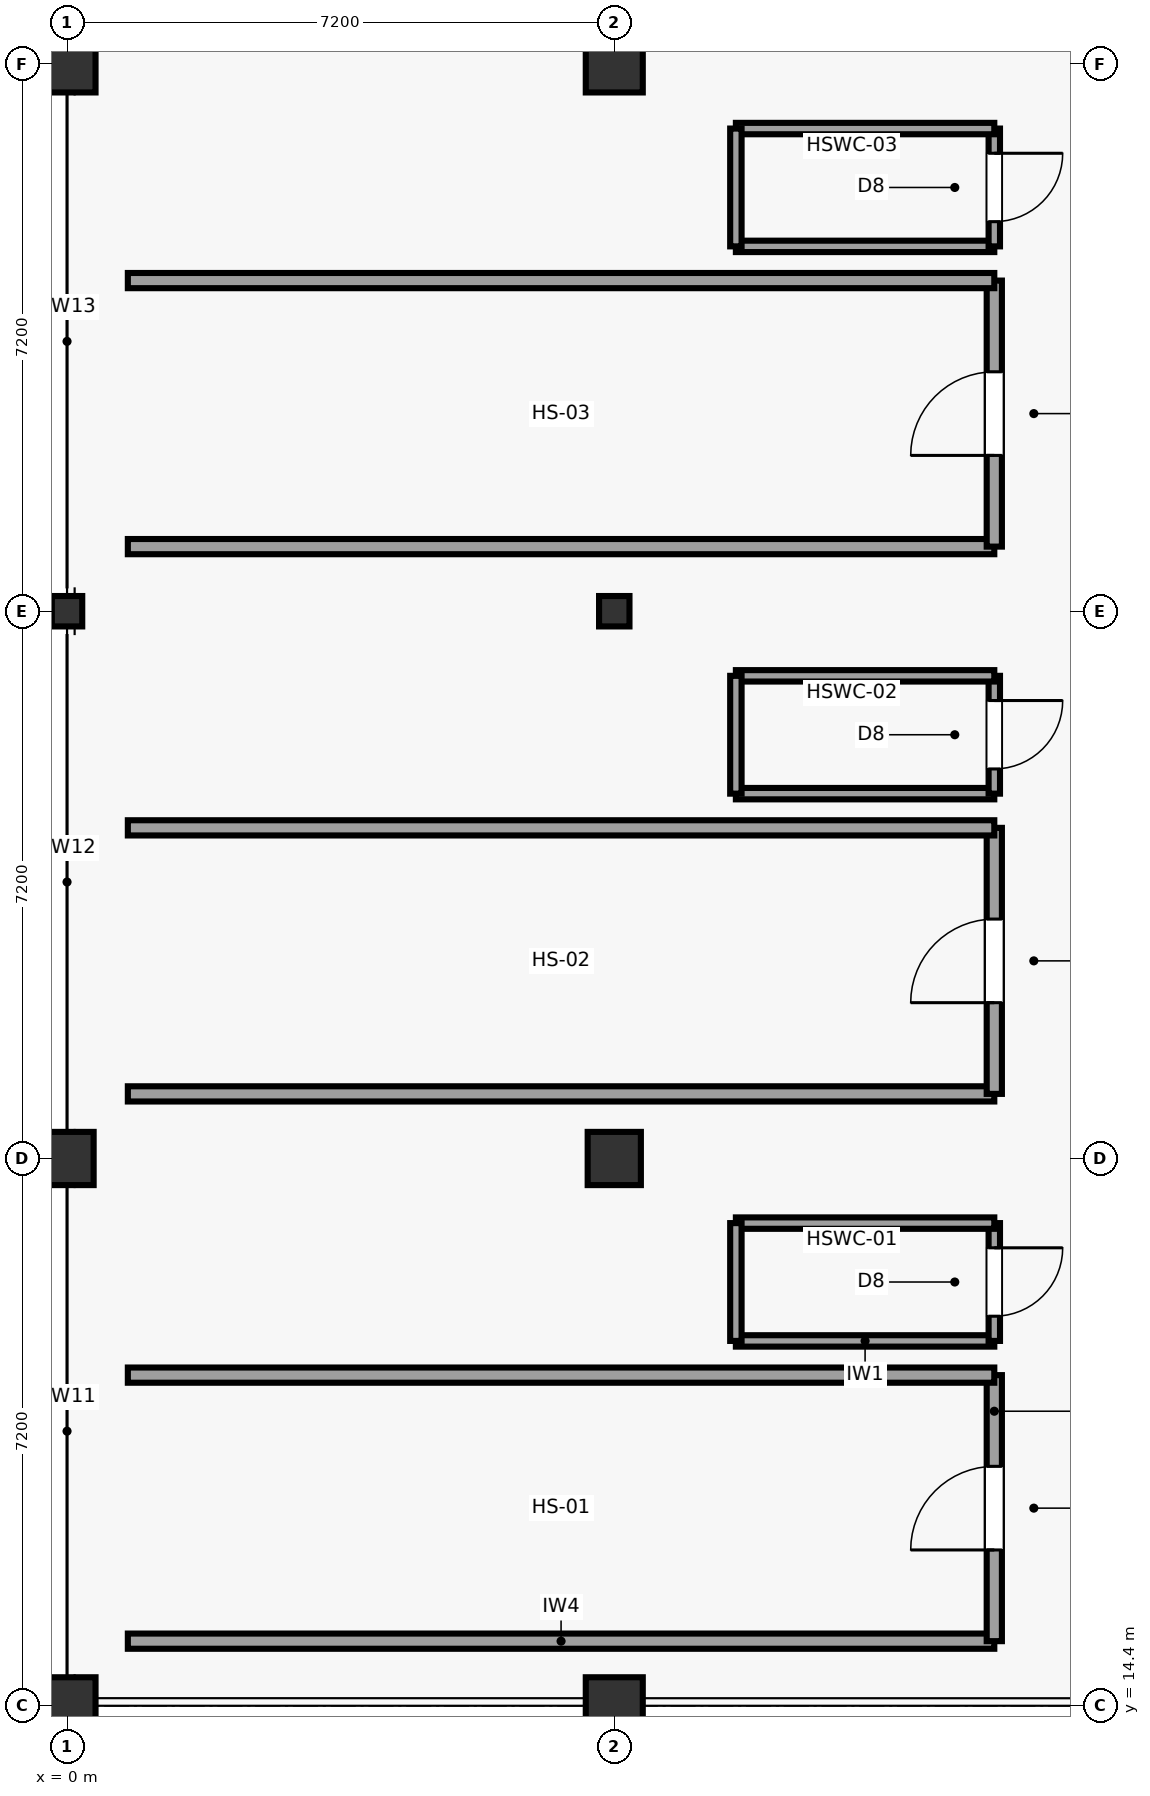
"""IFC4 building model, lengths in metres.
Left out: names, types, materials, properties, quantities, classifications, styles, units other than length and angle.
Written with IfcOpenShell. Run it as: python <this file> out.ifc"""

import sys

from ifc_helpers import new_model, si_unit, direction, frame, frame_2d, origin, origin_2d, place, context, subcontext, project, spatial, rectangle, hollow_rectangle, extrude, element, fill, save


model = new_model("IFC4")
c1 = context("Model", 3, precision=1e-05, world=origin(), true_north=direction((0.0, 1.0)))
c2 = subcontext(c1, "Body", "Model", "MODEL_VIEW")
j1 = project(units=[si_unit("LENGTHUNIT", "METRE"), si_unit("PLANEANGLEUNIT", "RADIAN")], contexts=[c1])
p1 = place(None, origin())
s1 = spatial("IfcSite", under=j1, at=p1, CompositionType="ELEMENT")
p2 = place(p1, origin())
s2 = spatial("IfcBuilding", under=s1, at=p2, CompositionType="ELEMENT")
p3 = place(p2, frame((0.0, 0.0, 9.6)))
s3 = spatial("IfcBuildingStorey", under=s2, at=p3, CompositionType="ELEMENT", Elevation=9.6)
p4 = place(p3, frame((0.0, 14.4, 0.0), z_axis=(0.0, 0.0, 1.0), x_axis=(1.0, 0.0, 0.0)))
e1 = element("IfcColumn", 1, at=p4, inside=s3, PredefinedType="COLUMN", context=c2, shape_type="SweptSolid", body=[
    extrude(rectangle(XDim=0.75, YDim=0.75, at=origin_2d()), origin(), (0.0, 0.0, 1.0), 4.2),
])
p5 = place(p3, frame((0.0, 21.6, 0.0), z_axis=(0.0, 0.0, 1.0), x_axis=(1.0, 0.0, 0.0)))
e2 = element("IfcColumn", 2, at=p5, inside=s3, PredefinedType="COLUMN", context=c2, shape_type="SweptSolid", body=[
    extrude(rectangle(XDim=0.7, YDim=0.7, at=origin_2d()), origin(), (0.0, 0.0, 1.0), 4.2),
])
p6 = place(p3, frame((0.0, 28.8, 0.0), z_axis=(0.0, 0.0, 1.0), x_axis=(1.0, 0.0, 0.0)))
e3 = element("IfcColumn", 3, at=p6, inside=s3, PredefinedType="COLUMN", context=c2, shape_type="SweptSolid", body=[
    extrude(hollow_rectangle(XDim=0.4, YDim=0.4, WallThickness=0.02, at=origin_2d()), origin(), (0.0, 0.0, 1.0), 4.2),
])
for number, where, z_axis, x_axis in (
    (4, (0.0, 36.0, 0.0), (0.0, 0.0, 1.0), (1.0, 0.0, 0.0)),
    (5, (7.2, 14.4, 0.0), (0.0, 0.0, 1.0), (1.0, 0.0, 0.0)),
):
    element("IfcColumn", number, at=place(p3, frame(where, z_axis=z_axis, x_axis=x_axis)), inside=s3, PredefinedType="COLUMN", context=c2, shape_type="SweptSolid", body=[
        extrude(rectangle(XDim=0.75, YDim=0.75, at=origin_2d()), origin(), (0.0, 0.0, 1.0), 4.2),
    ])
p7 = place(p3, frame((7.2, 21.6, 0.0), z_axis=(0.0, 0.0, 1.0), x_axis=(1.0, 0.0, 0.0)))
e6 = element("IfcColumn", 6, at=p7, inside=s3, PredefinedType="COLUMN", context=c2, shape_type="SweptSolid", body=[
    extrude(rectangle(XDim=0.7, YDim=0.7, at=origin_2d()), origin(), (0.0, 0.0, 1.0), 4.2),
])
p8 = place(p3, frame((7.2, 28.8, 0.0), z_axis=(0.0, 0.0, 1.0), x_axis=(1.0, 0.0, 0.0)))
e7 = element("IfcColumn", 7, at=p8, inside=s3, PredefinedType="COLUMN", context=c2, shape_type="SweptSolid", body=[
    extrude(hollow_rectangle(XDim=0.4, YDim=0.4, WallThickness=0.02, at=origin_2d()), origin(), (0.0, 0.0, 1.0), 4.2),
])
p9 = place(p3, frame((7.2, 36.0, 0.0), z_axis=(0.0, 0.0, 1.0), x_axis=(1.0, 0.0, 0.0)))
e8 = element("IfcColumn", 8, at=p9, inside=s3, PredefinedType="COLUMN", context=c2, shape_type="SweptSolid", body=[
    extrude(rectangle(XDim=0.75, YDim=0.75, at=origin_2d()), origin(), (0.0, 0.0, 1.0), 4.2),
])
p10 = place(p3, frame((0.8, 15.25, 0.0), z_axis=(0.0, 0.0, 1.0), x_axis=(1.0, 0.0, 0.0)))
e9 = element("IfcWall", 9, at=p10, inside=s3, PredefinedType="PARTITIONING", context=c2, shape_type="SweptSolid", body=[
    extrude(rectangle(XDim=11.4, YDim=0.2, at=frame_2d((5.7, 0.0))), origin(), (0.0, 0.0, 1.0), 2.94),
])
p11 = place(p3, frame((12.2, 15.25, 0.0), z_axis=(0.0, 0.0, 1.0), x_axis=(0.0, 1.0, 0.0)))
e10 = element("IfcWall", 10, at=p11, inside=s3, PredefinedType="PARTITIONING", context=c2, shape_type="SweptSolid", body=[
    extrude(rectangle(XDim=3.5, YDim=0.2, at=frame_2d((1.75, 0.0))), origin(), (0.0, 0.0, 1.0), 2.94),
])
p12 = place(p11, frame((1.2, 0.0, 0.0)))
e11 = element("IfcOpeningElement", 11, at=p12, cuts=e10, PredefinedType="OPENING", context=c2, shape_type="SweptSolid", body=[
    extrude(rectangle(XDim=1.1, YDim=2.25, at=frame_2d((0.55, 1.125))), frame((0.0, 0.11, 0.0), z_axis=(0.0, -1.0, 0.0), x_axis=(1.0, 0.0, 0.0)), (0.0, 0.0, 1.0), 0.22),
])
p13 = place(p3, frame((12.2, 18.75, 0.0), z_axis=(0.0, 0.0, 1.0), x_axis=(-1.0, 0.0, 0.0)))
e12 = element("IfcWall", 12, at=p13, inside=s3, PredefinedType="PARTITIONING", context=c2, shape_type="SweptSolid", body=[
    extrude(rectangle(XDim=11.4, YDim=0.2, at=frame_2d((5.7, 0.0))), origin(), (0.0, 0.0, 1.0), 2.94),
])
p14 = place(p3, frame((8.8, 19.2, 0.0), z_axis=(0.0, 0.0, 1.0), x_axis=(1.0, 0.0, 0.0)))
e13 = element("IfcWall", 13, at=p14, inside=s3, PredefinedType="PARTITIONING", context=c2, shape_type="SweptSolid", body=[
    extrude(rectangle(XDim=3.4, YDim=0.15, at=frame_2d((1.7, 0.0))), origin(), (0.0, 0.0, 1.0), 2.94),
])
p15 = place(p3, frame((12.2, 19.2, 0.0), z_axis=(0.0, 0.0, 1.0), x_axis=(0.0, 1.0, 0.0)))
e14 = element("IfcWall", 14, at=p15, inside=s3, PredefinedType="PARTITIONING", context=c2, shape_type="SweptSolid", body=[
    extrude(rectangle(XDim=1.55, YDim=0.15, at=frame_2d((0.775, 0.0))), origin(), (0.0, 0.0, 1.0), 2.94),
])
p16 = place(p15, frame((0.325, 0.0, 0.0)))
e15 = element("IfcOpeningElement", 15, at=p16, cuts=e14, PredefinedType="OPENING", context=c2, shape_type="SweptSolid", body=[
    extrude(rectangle(XDim=0.9, YDim=2.15, at=frame_2d((0.45, 1.075))), frame((0.0, 0.085, 0.0), z_axis=(0.0, -1.0, 0.0), x_axis=(1.0, 0.0, 0.0)), (0.0, 0.0, 1.0), 0.17),
])
p17 = place(p3, frame((12.2, 20.75, 0.0), z_axis=(0.0, 0.0, 1.0), x_axis=(-1.0, 0.0, 0.0)))
e16 = element("IfcWall", 16, at=p17, inside=s3, PredefinedType="PARTITIONING", context=c2, shape_type="SweptSolid", body=[
    extrude(rectangle(XDim=3.4, YDim=0.15, at=frame_2d((1.7, 0.0))), origin(), (0.0, 0.0, 1.0), 2.94),
])
p18 = place(p3, frame((8.8, 20.75, 0.0), z_axis=(0.0, 0.0, 1.0), x_axis=(0.0, -1.0, 0.0)))
e17 = element("IfcWall", 17, at=p18, inside=s3, PredefinedType="PARTITIONING", context=c2, shape_type="SweptSolid", body=[
    extrude(rectangle(XDim=1.55, YDim=0.15, at=frame_2d((0.775, 0.0))), origin(), (0.0, 0.0, 1.0), 2.94),
])
p19 = place(p3, frame((0.8, 22.45, 0.0), z_axis=(0.0, 0.0, 1.0), x_axis=(1.0, 0.0, 0.0)))
e18 = element("IfcWall", 18, at=p19, inside=s3, PredefinedType="PARTITIONING", context=c2, shape_type="SweptSolid", body=[
    extrude(rectangle(XDim=11.4, YDim=0.2, at=frame_2d((5.7, 0.0))), origin(), (0.0, 0.0, 1.0), 2.94),
])
p20 = place(p3, frame((12.2, 22.45, 0.0), z_axis=(0.0, 0.0, 1.0), x_axis=(0.0, 1.0, 0.0)))
e19 = element("IfcWall", 19, at=p20, inside=s3, PredefinedType="PARTITIONING", context=c2, shape_type="SweptSolid", body=[
    extrude(rectangle(XDim=3.5, YDim=0.2, at=frame_2d((1.75, 0.0))), origin(), (0.0, 0.0, 1.0), 2.94),
])
p21 = place(p20, frame((1.2, 0.0, 0.0)))
e20 = element("IfcOpeningElement", 20, at=p21, cuts=e19, PredefinedType="OPENING", context=c2, shape_type="SweptSolid", body=[
    extrude(rectangle(XDim=1.1, YDim=2.25, at=frame_2d((0.55, 1.125))), frame((0.0, 0.11, 0.0), z_axis=(0.0, -1.0, 0.0), x_axis=(1.0, 0.0, 0.0)), (0.0, 0.0, 1.0), 0.22),
])
p22 = place(p3, frame((12.2, 25.95, 0.0), z_axis=(0.0, 0.0, 1.0), x_axis=(-1.0, 0.0, 0.0)))
e21 = element("IfcWall", 21, at=p22, inside=s3, PredefinedType="PARTITIONING", context=c2, shape_type="SweptSolid", body=[
    extrude(rectangle(XDim=11.4, YDim=0.2, at=frame_2d((5.7, 0.0))), origin(), (0.0, 0.0, 1.0), 2.94),
])
p23 = place(p3, frame((8.8, 26.4, 0.0), z_axis=(0.0, 0.0, 1.0), x_axis=(1.0, 0.0, 0.0)))
e22 = element("IfcWall", 22, at=p23, inside=s3, PredefinedType="PARTITIONING", context=c2, shape_type="SweptSolid", body=[
    extrude(rectangle(XDim=3.4, YDim=0.15, at=frame_2d((1.7, 0.0))), origin(), (0.0, 0.0, 1.0), 2.94),
])
p24 = place(p3, frame((12.2, 26.4, 0.0), z_axis=(0.0, 0.0, 1.0), x_axis=(0.0, 1.0, 0.0)))
e23 = element("IfcWall", 23, at=p24, inside=s3, PredefinedType="PARTITIONING", context=c2, shape_type="SweptSolid", body=[
    extrude(rectangle(XDim=1.55, YDim=0.15, at=frame_2d((0.775, 0.0))), origin(), (0.0, 0.0, 1.0), 2.94),
])
p25 = place(p24, frame((0.325, 0.0, 0.0)))
e24 = element("IfcOpeningElement", 24, at=p25, cuts=e23, PredefinedType="OPENING", context=c2, shape_type="SweptSolid", body=[
    extrude(rectangle(XDim=0.9, YDim=2.15, at=frame_2d((0.45, 1.075))), frame((0.0, 0.085, 0.0), z_axis=(0.0, -1.0, 0.0), x_axis=(1.0, 0.0, 0.0)), (0.0, 0.0, 1.0), 0.17),
])
p26 = place(p3, frame((12.2, 27.95, 0.0), z_axis=(0.0, 0.0, 1.0), x_axis=(-1.0, 0.0, 0.0)))
e25 = element("IfcWall", 25, at=p26, inside=s3, PredefinedType="PARTITIONING", context=c2, shape_type="SweptSolid", body=[
    extrude(rectangle(XDim=3.4, YDim=0.15, at=frame_2d((1.7, 0.0))), origin(), (0.0, 0.0, 1.0), 2.94),
])
p27 = place(p3, frame((8.8, 27.95, 0.0), z_axis=(0.0, 0.0, 1.0), x_axis=(0.0, -1.0, 0.0)))
e26 = element("IfcWall", 26, at=p27, inside=s3, PredefinedType="PARTITIONING", context=c2, shape_type="SweptSolid", body=[
    extrude(rectangle(XDim=1.55, YDim=0.15, at=frame_2d((0.775, 0.0))), origin(), (0.0, 0.0, 1.0), 2.94),
])
p28 = place(p3, frame((0.8, 29.65, 0.0), z_axis=(0.0, 0.0, 1.0), x_axis=(1.0, 0.0, 0.0)))
e27 = element("IfcWall", 27, at=p28, inside=s3, PredefinedType="PARTITIONING", context=c2, shape_type="SweptSolid", body=[
    extrude(rectangle(XDim=11.4, YDim=0.2, at=frame_2d((5.7, 0.0))), origin(), (0.0, 0.0, 1.0), 2.94),
])
p29 = place(p3, frame((12.2, 29.65, 0.0), z_axis=(0.0, 0.0, 1.0), x_axis=(0.0, 1.0, 0.0)))
e28 = element("IfcWall", 28, at=p29, inside=s3, PredefinedType="PARTITIONING", context=c2, shape_type="SweptSolid", body=[
    extrude(rectangle(XDim=3.5, YDim=0.2, at=frame_2d((1.75, 0.0))), origin(), (0.0, 0.0, 1.0), 2.94),
])
p30 = place(p29, frame((1.2, 0.0, 0.0)))
e29 = element("IfcOpeningElement", 29, at=p30, cuts=e28, PredefinedType="OPENING", context=c2, shape_type="SweptSolid", body=[
    extrude(rectangle(XDim=1.1, YDim=2.25, at=frame_2d((0.55, 1.125))), frame((0.0, 0.11, 0.0), z_axis=(0.0, -1.0, 0.0), x_axis=(1.0, 0.0, 0.0)), (0.0, 0.0, 1.0), 0.22),
])
p31 = place(p3, frame((12.2, 33.15, 0.0), z_axis=(0.0, 0.0, 1.0), x_axis=(-1.0, 0.0, 0.0)))
e30 = element("IfcWall", 30, at=p31, inside=s3, PredefinedType="PARTITIONING", context=c2, shape_type="SweptSolid", body=[
    extrude(rectangle(XDim=11.4, YDim=0.2, at=frame_2d((5.7, 0.0))), origin(), (0.0, 0.0, 1.0), 2.94),
])
p32 = place(p3, frame((8.8, 33.6, 0.0), z_axis=(0.0, 0.0, 1.0), x_axis=(1.0, 0.0, 0.0)))
e31 = element("IfcWall", 31, at=p32, inside=s3, PredefinedType="PARTITIONING", context=c2, shape_type="SweptSolid", body=[
    extrude(rectangle(XDim=3.4, YDim=0.15, at=frame_2d((1.7, 0.0))), origin(), (0.0, 0.0, 1.0), 2.94),
])
p33 = place(p3, frame((12.2, 33.6, 0.0), z_axis=(0.0, 0.0, 1.0), x_axis=(0.0, 1.0, 0.0)))
e32 = element("IfcWall", 32, at=p33, inside=s3, PredefinedType="PARTITIONING", context=c2, shape_type="SweptSolid", body=[
    extrude(rectangle(XDim=1.55, YDim=0.15, at=frame_2d((0.775, 0.0))), origin(), (0.0, 0.0, 1.0), 2.94),
])
p34 = place(p33, frame((0.325, 0.0, 0.0)))
e33 = element("IfcOpeningElement", 33, at=p34, cuts=e32, PredefinedType="OPENING", context=c2, shape_type="SweptSolid", body=[
    extrude(rectangle(XDim=0.9, YDim=2.15, at=frame_2d((0.45, 1.075))), frame((0.0, 0.085, 0.0), z_axis=(0.0, -1.0, 0.0), x_axis=(1.0, 0.0, 0.0)), (0.0, 0.0, 1.0), 0.17),
])
p35 = place(p3, frame((12.2, 35.15, 0.0), z_axis=(0.0, 0.0, 1.0), x_axis=(-1.0, 0.0, 0.0)))
e34 = element("IfcWall", 34, at=p35, inside=s3, PredefinedType="PARTITIONING", context=c2, shape_type="SweptSolid", body=[
    extrude(rectangle(XDim=3.4, YDim=0.15, at=frame_2d((1.7, 0.0))), origin(), (0.0, 0.0, 1.0), 2.94),
])
p36 = place(p3, frame((8.8, 35.15, 0.0), z_axis=(0.0, 0.0, 1.0), x_axis=(0.0, -1.0, 0.0)))
e35 = element("IfcWall", 35, at=p36, inside=s3, PredefinedType="PARTITIONING", context=c2, shape_type="SweptSolid", body=[
    extrude(rectangle(XDim=1.55, YDim=0.15, at=frame_2d((0.775, 0.0))), origin(), (0.0, 0.0, 1.0), 2.94),
])
p37 = place(p12, origin())
e36 = element("IfcDoor", 36, at=p37, inside=s3, OperationType="SINGLE_SWING_LEFT", PredefinedType="DOOR", context=c2, shape_type="SweptSolid", body=[
    extrude(rectangle(XDim=1.1, YDim=2.25, at=frame_2d((0.55, 1.125))), frame((0.0, 0.025, 0.0), z_axis=(0.0, -1.0, 0.0), x_axis=(1.0, 0.0, 0.0)), (0.0, 0.0, 1.0), 0.05),
])
fill(e11, e36)
p38 = place(p16, frame((0.9, 0.0, 0.0), z_axis=(0.0, 0.0, 1.0), x_axis=(-1.0, 0.0, 0.0)))
e37 = element("IfcDoor", 37, at=p38, inside=s3, OperationType="SINGLE_SWING_RIGHT", PredefinedType="DOOR", context=c2, shape_type="SweptSolid", body=[
    extrude(rectangle(XDim=0.9, YDim=2.15, at=frame_2d((0.45, 1.075))), frame((0.0, 0.025, 0.0), z_axis=(0.0, -1.0, 0.0), x_axis=(1.0, 0.0, 0.0)), (0.0, 0.0, 1.0), 0.05),
])
fill(e15, e37)
p39 = place(p21, origin())
e38 = element("IfcDoor", 38, at=p39, inside=s3, OperationType="SINGLE_SWING_LEFT", PredefinedType="DOOR", context=c2, shape_type="SweptSolid", body=[
    extrude(rectangle(XDim=1.1, YDim=2.25, at=frame_2d((0.55, 1.125))), frame((0.0, 0.025, 0.0), z_axis=(0.0, -1.0, 0.0), x_axis=(1.0, 0.0, 0.0)), (0.0, 0.0, 1.0), 0.05),
])
fill(e20, e38)
p40 = place(p25, frame((0.9, 0.0, 0.0), z_axis=(0.0, 0.0, 1.0), x_axis=(-1.0, 0.0, 0.0)))
e39 = element("IfcDoor", 39, at=p40, inside=s3, OperationType="SINGLE_SWING_RIGHT", PredefinedType="DOOR", context=c2, shape_type="SweptSolid", body=[
    extrude(rectangle(XDim=0.9, YDim=2.15, at=frame_2d((0.45, 1.075))), frame((0.0, 0.025, 0.0), z_axis=(0.0, -1.0, 0.0), x_axis=(1.0, 0.0, 0.0)), (0.0, 0.0, 1.0), 0.05),
])
fill(e24, e39)
p41 = place(p30, origin())
e40 = element("IfcDoor", 40, at=p41, inside=s3, OperationType="SINGLE_SWING_LEFT", PredefinedType="DOOR", context=c2, shape_type="SweptSolid", body=[
    extrude(rectangle(XDim=1.1, YDim=2.25, at=frame_2d((0.55, 1.125))), frame((0.0, 0.025, 0.0), z_axis=(0.0, -1.0, 0.0), x_axis=(1.0, 0.0, 0.0)), (0.0, 0.0, 1.0), 0.05),
])
fill(e29, e40)
p42 = place(p34, frame((0.9, 0.0, 0.0), z_axis=(0.0, 0.0, 1.0), x_axis=(-1.0, 0.0, 0.0)))
e41 = element("IfcDoor", 41, at=p42, inside=s3, OperationType="SINGLE_SWING_RIGHT", PredefinedType="DOOR", context=c2, shape_type="SweptSolid", body=[
    extrude(rectangle(XDim=0.9, YDim=2.15, at=frame_2d((0.45, 1.075))), frame((0.0, 0.025, 0.0), z_axis=(0.0, -1.0, 0.0), x_axis=(1.0, 0.0, 0.0)), (0.0, 0.0, 1.0), 0.05),
])
fill(e33, e41)
save(model, sys.argv[1])
